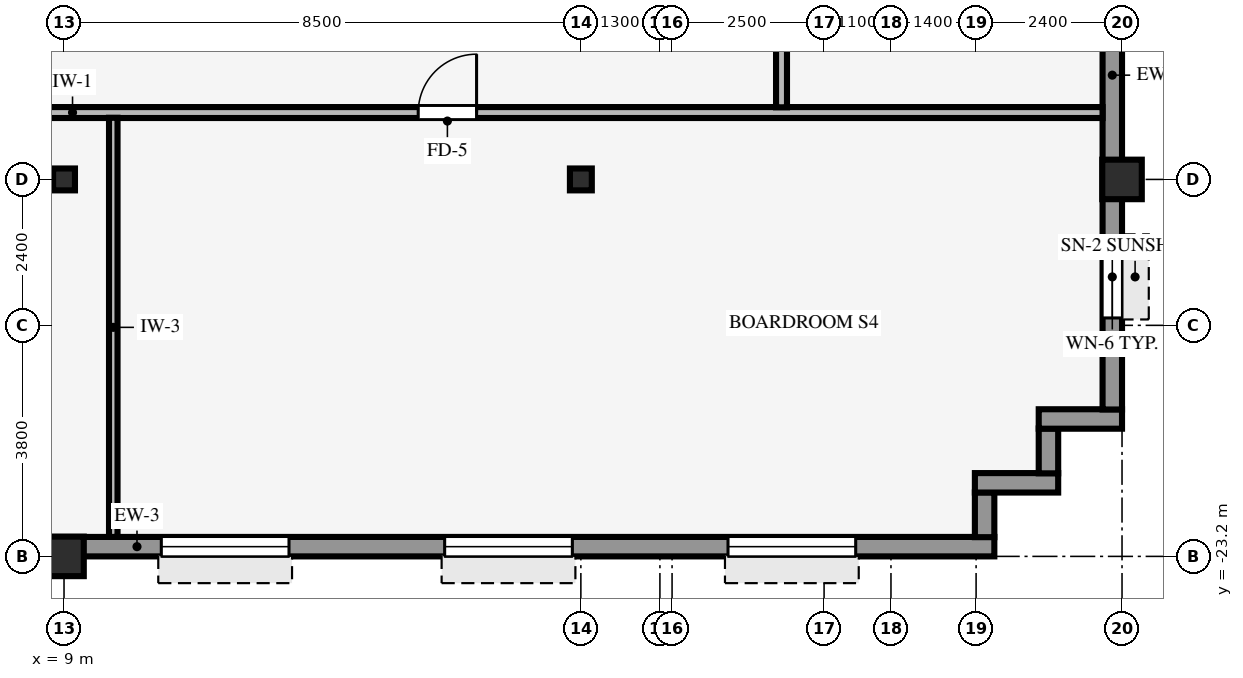
"""IFC4 building model, lengths in metres.
Left out: names, types, materials, properties, quantities, classifications, styles, units other than length and angle.
Written with IfcOpenShell. Run it as: python <this file> out.ifc"""

import sys

from ifc_helpers import new_model, si_unit, direction, frame, frame_2d, origin, origin_2d, place, context, subcontext, project, spatial, rectangle, hollow_rectangle, i_section, extrude, source, transform, mapped, element, fill, save


model = new_model("IFC4")
c1 = context("Model", 3, precision=1e-05, world=origin(), true_north=direction((0.0, 1.0)))
c2 = subcontext(c1, "Body", "Model", "MODEL_VIEW")
j1 = project(units=[si_unit("LENGTHUNIT", "METRE"), si_unit("PLANEANGLEUNIT", "RADIAN")], contexts=[c1])
p1 = place(None, origin())
s1 = spatial("IfcSite", under=j1, at=p1, CompositionType="ELEMENT")
p2 = place(p1, origin())
s2 = spatial("IfcBuilding", under=s1, at=p2, CompositionType="ELEMENT")
p3 = place(p2, frame((0.0, 0.0, 123.85)))
s3 = spatial("IfcBuildingStorey", under=s2, at=p3, CompositionType="ELEMENT", Elevation=123.85)
for number, where, z_axis, x_axis in (
    (1, (26.4, -17.0, 0.0), (0.0, 0.0, 1.0), (1.0, 0.0, 0.0)),
    (2, (9.0, -23.2, 0.0), (0.0, 0.0, 1.0), (1.0, 0.0, 0.0)),
):
    element("IfcColumn", number, at=place(p3, frame(where, z_axis=z_axis, x_axis=x_axis)), inside=s3, PredefinedType="COLUMN", context=c2, shape_type="SweptSolid", body=[
        extrude(hollow_rectangle(XDim=0.65, YDim=0.65, WallThickness=0.04, InnerFilletRadius=0.04, OuterFilletRadius=0.08, at=origin_2d()), origin(), (0.0, 0.0, 1.0), 3.37),
    ])
for number, where, z_axis, x_axis in (
    (3, (9.0, -17.0, 0.0), (0.0, 0.0, 1.0), (1.0, 0.0, 0.0)),
    (4, (17.5, -17.0, 0.0), (0.0, 0.0, 1.0), (1.0, 0.0, 0.0)),
):
    element("IfcColumn", number, at=place(p3, frame(where, z_axis=z_axis, x_axis=x_axis)), inside=s3, PredefinedType="COLUMN", context=c2, shape_type="SweptSolid", body=[
        extrude(i_section(OverallWidth=0.36, OverallDepth=0.36, WebThickness=0.021, FlangeThickness=0.021, FilletRadius=0.018, at=origin_2d()), origin(), (0.0, 0.0, 1.0), 3.37),
    ])
p4 = place(p3, frame((-24.3, -23.04, 0.0), z_axis=(0.0, 0.0, 1.0), x_axis=(1.0, 0.0, 0.0)))
e5 = element("IfcWall", 5, at=p4, inside=s3, PredefinedType="STANDARD", context=c2, shape_type="SweptSolid", body=[
    extrude(rectangle(XDim=48.6, YDim=0.32, at=frame_2d((24.3, 0.0))), origin(), (0.0, 0.0, 1.0), 2.705),
])
p5 = place(p4, frame((19.98, 0.0, 0.0), z_axis=(0.0, 0.0, 1.0), x_axis=(-1.0, 0.0, 0.0)))
e6 = element("IfcOpeningElement", 6, at=p5, cuts=e5, PredefinedType="OPENING", context=c2, shape_type="SweptSolid", body=[
    extrude(rectangle(XDim=0.98, YDim=2.15, at=frame_2d((0.49, 1.075))), frame((0.0, 0.17, 0.0), z_axis=(0.0, -1.0, 0.0), x_axis=(1.0, 0.0, 0.0)), (0.0, 0.0, 1.0), 0.34),
])
p6 = place(p4, frame((2.28, 0.0, 0.8)))
e7 = element("IfcOpeningElement", 7, at=p6, cuts=e5, PredefinedType="OPENING", context=c2, shape_type="SweptSolid", body=[
    extrude(rectangle(XDim=2.1, YDim=1.56, at=frame_2d((1.05, 0.78))), frame((0.0, 0.17, 0.0), z_axis=(0.0, -1.0, 0.0), x_axis=(1.0, 0.0, 0.0)), (0.0, 0.0, 1.0), 0.34),
])
p7 = place(p4, frame((6.94, 0.0, 0.8)))
e8 = element("IfcOpeningElement", 8, at=p7, cuts=e5, PredefinedType="OPENING", context=c2, shape_type="SweptSolid", body=[
    extrude(rectangle(XDim=2.1, YDim=1.56, at=frame_2d((1.05, 0.78))), frame((0.0, 0.17, 0.0), z_axis=(0.0, -1.0, 0.0), x_axis=(1.0, 0.0, 0.0)), (0.0, 0.0, 1.0), 0.34),
])
p8 = place(p4, frame((11.6, 0.0, 0.8)))
e9 = element("IfcOpeningElement", 9, at=p8, cuts=e5, PredefinedType="OPENING", context=c2, shape_type="SweptSolid", body=[
    extrude(rectangle(XDim=2.1, YDim=1.56, at=frame_2d((1.05, 0.78))), frame((0.0, 0.17, 0.0), z_axis=(0.0, -1.0, 0.0), x_axis=(1.0, 0.0, 0.0)), (0.0, 0.0, 1.0), 0.34),
])
p9 = place(p4, frame((16.26, 0.0, 0.8)))
e10 = element("IfcOpeningElement", 10, at=p9, cuts=e5, PredefinedType="OPENING", context=c2, shape_type="SweptSolid", body=[
    extrude(rectangle(XDim=2.1, YDim=1.56, at=frame_2d((1.05, 0.78))), frame((0.0, 0.17, 0.0), z_axis=(0.0, -1.0, 0.0), x_axis=(1.0, 0.0, 0.0)), (0.0, 0.0, 1.0), 0.34),
])
p10 = place(p4, frame((20.92, 0.0, 0.8)))
e11 = element("IfcOpeningElement", 11, at=p10, cuts=e5, PredefinedType="OPENING", context=c2, shape_type="SweptSolid", body=[
    extrude(rectangle(XDim=2.1, YDim=1.56, at=frame_2d((1.05, 0.78))), frame((0.0, 0.17, 0.0), z_axis=(0.0, -1.0, 0.0), x_axis=(1.0, 0.0, 0.0)), (0.0, 0.0, 1.0), 0.34),
])
p11 = place(p4, frame((25.58, 0.0, 0.8)))
e12 = element("IfcOpeningElement", 12, at=p11, cuts=e5, PredefinedType="OPENING", context=c2, shape_type="SweptSolid", body=[
    extrude(rectangle(XDim=2.1, YDim=1.56, at=frame_2d((1.05, 0.78))), frame((0.0, 0.17, 0.0), z_axis=(0.0, -1.0, 0.0), x_axis=(1.0, 0.0, 0.0)), (0.0, 0.0, 1.0), 0.34),
])
p12 = place(p4, frame((30.24, 0.0, 0.8)))
e13 = element("IfcOpeningElement", 13, at=p12, cuts=e5, PredefinedType="OPENING", context=c2, shape_type="SweptSolid", body=[
    extrude(rectangle(XDim=2.1, YDim=1.56, at=frame_2d((1.05, 0.78))), frame((0.0, 0.17, 0.0), z_axis=(0.0, -1.0, 0.0), x_axis=(1.0, 0.0, 0.0)), (0.0, 0.0, 1.0), 0.34),
])
p13 = place(p4, frame((34.9, 0.0, 0.8)))
e14 = element("IfcOpeningElement", 14, at=p13, cuts=e5, PredefinedType="OPENING", context=c2, shape_type="SweptSolid", body=[
    extrude(rectangle(XDim=2.1, YDim=1.56, at=frame_2d((1.05, 0.78))), frame((0.0, 0.17, 0.0), z_axis=(0.0, -1.0, 0.0), x_axis=(1.0, 0.0, 0.0)), (0.0, 0.0, 1.0), 0.34),
])
p14 = place(p4, frame((39.56, 0.0, 0.8)))
e15 = element("IfcOpeningElement", 15, at=p14, cuts=e5, PredefinedType="OPENING", context=c2, shape_type="SweptSolid", body=[
    extrude(rectangle(XDim=2.1, YDim=1.56, at=frame_2d((1.05, 0.78))), frame((0.0, 0.17, 0.0), z_axis=(0.0, -1.0, 0.0), x_axis=(1.0, 0.0, 0.0)), (0.0, 0.0, 1.0), 0.34),
])
p15 = place(p4, frame((44.22, 0.0, 0.8)))
e16 = element("IfcOpeningElement", 16, at=p15, cuts=e5, PredefinedType="OPENING", context=c2, shape_type="SweptSolid", body=[
    extrude(rectangle(XDim=2.1, YDim=1.56, at=frame_2d((1.05, 0.78))), frame((0.0, 0.17, 0.0), z_axis=(0.0, -1.0, 0.0), x_axis=(1.0, 0.0, 0.0)), (0.0, 0.0, 1.0), 0.34),
])
p16 = place(p3, frame((24.14, -22.884, 0.0), z_axis=(0.0, 0.0, 1.0), x_axis=(0.0, 1.0, 0.0)))
e17 = element("IfcWall", 17, at=p16, inside=s3, PredefinedType="STANDARD", context=c2, shape_type="SweptSolid", body=[
    extrude(rectangle(XDim=0.738, YDim=0.32, at=frame_2d((0.369, 0.0))), origin(), (0.0, 0.0, 1.0), 3.36),
])
p17 = place(p3, frame((23.98, -21.99, 0.0), z_axis=(0.0, 0.0, 1.0), x_axis=(1.0, 0.0, 0.0)))
e18 = element("IfcWall", 18, at=p17, inside=s3, PredefinedType="STANDARD", context=c2, shape_type="SweptSolid", body=[
    extrude(rectangle(XDim=1.37, YDim=0.32, at=frame_2d((0.685, 0.0))), origin(), (0.0, 0.0, 1.0), 3.36),
])
p18 = place(p3, frame((25.19, -21.834, 0.0), z_axis=(0.0, 0.0, 1.0), x_axis=(0.0, 1.0, 0.0)))
e19 = element("IfcWall", 19, at=p18, inside=s3, PredefinedType="STANDARD", context=c2, shape_type="SweptSolid", body=[
    extrude(rectangle(XDim=0.738, YDim=0.32, at=frame_2d((0.369, 0.0))), origin(), (0.0, 0.0, 1.0), 3.36),
])
p19 = place(p3, frame((25.03, -20.94, 0.0), z_axis=(0.0, 0.0, 1.0), x_axis=(1.0, 0.0, 0.0)))
e20 = element("IfcWall", 20, at=p19, inside=s3, PredefinedType="STANDARD", context=c2, shape_type="SweptSolid", body=[
    extrude(rectangle(XDim=1.37, YDim=0.32, at=frame_2d((0.685, 0.0))), origin(), (0.0, 0.0, 1.0), 3.36),
])
p20 = place(p3, frame((26.24, -20.784, 0.0), z_axis=(0.0, 0.0, 1.0), x_axis=(0.0, 1.0, 0.0)))
e21 = element("IfcWall", 21, at=p20, inside=s3, PredefinedType="STANDARD", context=c2, shape_type="SweptSolid", body=[
    extrude(rectangle(XDim=17.184, YDim=0.32, at=frame_2d((8.592, 0.0))), origin(), (0.0, 0.0, 1.0), 2.705),
])
p21 = place(p20, frame((1.506, 0.0, 0.8)))
e22 = element("IfcOpeningElement", 22, at=p21, cuts=e21, PredefinedType="OPENING", context=c2, shape_type="SweptSolid", body=[
    extrude(rectangle(XDim=1.35, YDim=1.56, at=frame_2d((0.675, 0.78))), frame((0.0, 0.17, 0.0), z_axis=(0.0, -1.0, 0.0), x_axis=(1.0, 0.0, 0.0)), (0.0, 0.0, 1.0), 0.34),
])
p22 = place(p20, frame((7.917, 0.0, 0.8)))
e23 = element("IfcOpeningElement", 23, at=p22, cuts=e21, PredefinedType="OPENING", context=c2, shape_type="SweptSolid", body=[
    extrude(rectangle(XDim=1.35, YDim=1.56, at=frame_2d((0.675, 0.78))), frame((0.0, 0.17, 0.0), z_axis=(0.0, -1.0, 0.0), x_axis=(1.0, 0.0, 0.0)), (0.0, 0.0, 1.0), 0.34),
])
p23 = place(p20, frame((12.978, 0.0, 0.8)))
e24 = element("IfcOpeningElement", 24, at=p23, cuts=e21, PredefinedType="OPENING", context=c2, shape_type="SweptSolid", body=[
    extrude(rectangle(XDim=1.35, YDim=1.56, at=frame_2d((0.675, 0.78))), frame((0.0, 0.17, 0.0), z_axis=(0.0, -1.0, 0.0), x_axis=(1.0, 0.0, 0.0)), (0.0, 0.0, 1.0), 0.34),
])
p24 = place(p3, frame((-26.08, -15.9, 0.0), z_axis=(0.0, 0.0, 1.0), x_axis=(1.0, 0.0, 0.0)))
e25 = element("IfcWall", 25, at=p24, inside=s3, PredefinedType="PARTITIONING", context=c2, shape_type="SweptSolid", body=[
    extrude(rectangle(XDim=52.16, YDim=0.18, at=frame_2d((26.08, 0.0))), origin(), (0.0, 0.0, 1.0), 3.36),
])
p25 = place(p24, frame((18.11, 0.0, 0.0)))
e26 = element("IfcOpeningElement", 26, at=p25, cuts=e25, PredefinedType="OPENING", context=c2, shape_type="SweptSolid", body=[
    extrude(rectangle(XDim=0.96, YDim=2.1, at=frame_2d((0.48, 1.05))), frame((0.0, 0.1, 0.0), z_axis=(0.0, -1.0, 0.0), x_axis=(1.0, 0.0, 0.0)), (0.0, 0.0, 1.0), 0.2),
])
p26 = place(p24, frame((40.905, 0.0, 0.0)))
e27 = element("IfcOpeningElement", 27, at=p26, cuts=e25, PredefinedType="OPENING", context=c2, shape_type="SweptSolid", body=[
    extrude(rectangle(XDim=0.96, YDim=2.1, at=frame_2d((0.48, 1.05))), frame((0.0, 0.1, 0.0), z_axis=(0.0, -1.0, 0.0), x_axis=(1.0, 0.0, 0.0)), (0.0, 0.0, 1.0), 0.2),
])
p27 = place(p24, frame((28.575, 0.0, 0.0)))
e28 = element("IfcOpeningElement", 28, at=p27, cuts=e25, PredefinedType="OPENING", context=c2, shape_type="SweptSolid", body=[
    extrude(rectangle(XDim=0.96, YDim=2.1, at=frame_2d((0.48, 1.05))), frame((0.0, 0.1, 0.0), z_axis=(0.0, -1.0, 0.0), x_axis=(1.0, 0.0, 0.0)), (0.0, 0.0, 1.0), 0.2),
])
p28 = place(p24, frame((9.585, 0.0, 0.0)))
e29 = element("IfcOpeningElement", 29, at=p28, cuts=e25, PredefinedType="OPENING", context=c2, shape_type="SweptSolid", body=[
    extrude(rectangle(XDim=0.96, YDim=2.1, at=frame_2d((0.48, 1.05))), frame((0.0, 0.1, 0.0), z_axis=(0.0, -1.0, 0.0), x_axis=(1.0, 0.0, 0.0)), (0.0, 0.0, 1.0), 0.2),
])
p29 = place(p3, frame((9.81, -22.88, 0.0), z_axis=(0.0, 0.0, 1.0), x_axis=(0.0, 1.0, 0.0)))
e30 = element("IfcWall", 30, at=p29, inside=s3, PredefinedType="PARTITIONING", context=c2, shape_type="SweptSolid", body=[
    extrude(rectangle(XDim=6.894, YDim=0.14, at=frame_2d((3.447, 0.0))), origin(), (0.0, 0.0, 1.0), 3.36),
])
p30 = place(p3, frame((20.8, -15.814, 0.0), z_axis=(0.0, 0.0, 1.0), x_axis=(0.0, 1.0, 0.0)))
e31 = element("IfcWall", 31, at=p30, inside=s3, PredefinedType="PARTITIONING", context=c2, shape_type="SweptSolid", body=[
    extrude(rectangle(XDim=2.228, YDim=0.18, at=frame_2d((1.114, 0.0))), origin(), (0.0, 0.0, 1.0), 3.36),
])
m1 = source(origin(), c2, "Body", "SweptSolid", [
    extrude(rectangle(XDim=2.1, YDim=1.56, at=frame_2d((1.05, 0.78))), frame((0.0, 0.03, 0.0), z_axis=(0.0, -1.0, 0.0), x_axis=(1.0, 0.0, 0.0)), (0.0, 0.0, 1.0), 0.06),
])
p31 = place(p13, origin())
e32 = element("IfcWindow", 32, at=p31, inside=s3, PartitioningType="SINGLE_PANEL", PredefinedType="WINDOW", context=c2, shape_type="MappedRepresentation", body=[
    mapped(m1, transform((0.0, 0.0, 0.0), scale=1.0)),
])
fill(e14, e32)
p32 = place(p14, origin())
e33 = element("IfcWindow", 33, at=p32, inside=s3, PartitioningType="SINGLE_PANEL", PredefinedType="WINDOW", context=c2, shape_type="MappedRepresentation", body=[
    mapped(m1, transform((0.0, 0.0, 0.0), scale=1.0)),
])
fill(e15, e33)
p33 = place(p15, origin())
e34 = element("IfcWindow", 34, at=p33, inside=s3, PartitioningType="SINGLE_PANEL", PredefinedType="WINDOW", context=c2, shape_type="MappedRepresentation", body=[
    mapped(m1, transform((0.0, 0.0, 0.0), scale=1.0)),
])
fill(e16, e34)
m2 = source(origin(), c2, "Body", "SweptSolid", [
    extrude(rectangle(XDim=1.35, YDim=1.56, at=frame_2d((0.675, 0.78))), frame((0.0, 0.03, 0.0), z_axis=(0.0, -1.0, 0.0), x_axis=(1.0, 0.0, 0.0)), (0.0, 0.0, 1.0), 0.06),
])
p34 = place(p21, origin())
e35 = element("IfcWindow", 35, at=p34, inside=s3, PartitioningType="SINGLE_PANEL", PredefinedType="WINDOW", context=c2, shape_type="MappedRepresentation", body=[
    mapped(m2, transform((0.0, 0.0, 0.0), scale=1.0)),
])
fill(e22, e35)
m3 = source(origin(), c2, "Body", "SweptSolid", [
    extrude(rectangle(XDim=0.96, YDim=2.1, at=frame_2d((0.48, 1.05))), frame((0.0, 0.025, 0.0), z_axis=(0.0, -1.0, 0.0), x_axis=(1.0, 0.0, 0.0)), (0.0, 0.0, 1.0), 0.05),
])
p35 = place(p26, origin())
e36 = element("IfcDoor", 36, at=p35, inside=s3, OperationType="SINGLE_SWING_RIGHT", PredefinedType="DOOR", context=c2, shape_type="MappedRepresentation", body=[
    mapped(m3, transform((0.0, 0.0, 0.0), scale=1.0)),
])
fill(e27, e36)
save(model, sys.argv[1])
